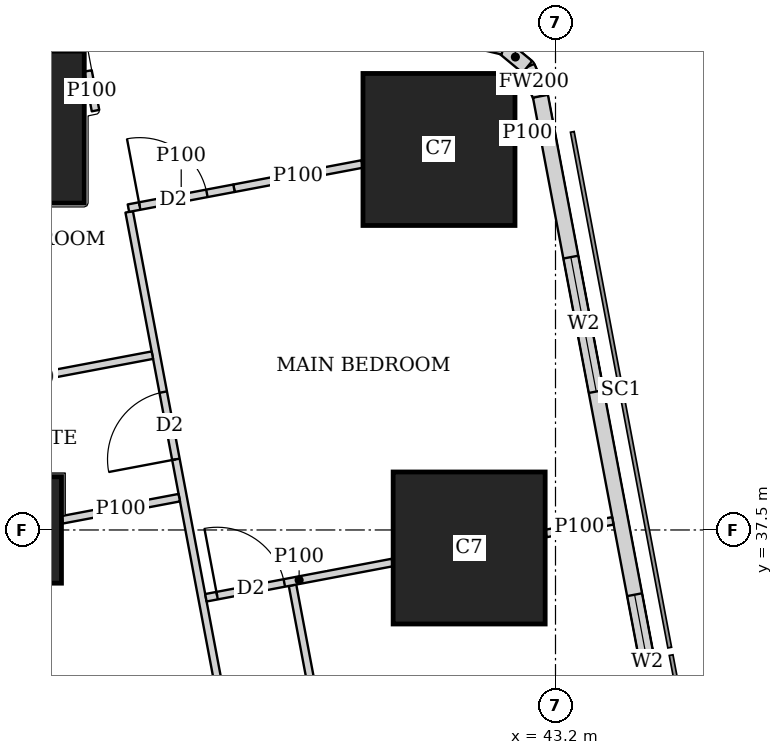
"""IFC4 building model, lengths in metres.
Left out: names, types, materials, properties, quantities, classifications, styles, units other than length and angle.
Written with IfcOpenShell. Run it as: python <this file> out.ifc"""

import sys

from ifc_helpers import new_model, si_unit, direction, frame, frame_2d, origin, origin_2d, place, context, subcontext, project, spatial, rectangle, extrude, element, fill, save


model = new_model("IFC4")
c1 = context("Model", 3, precision=1e-05, world=origin(), true_north=direction((0.0, 1.0)))
c2 = subcontext(c1, "Body", "Model", "MODEL_VIEW")
j1 = project(units=[si_unit("LENGTHUNIT", "METRE"), si_unit("PLANEANGLEUNIT", "RADIAN")], contexts=[c1])
p1 = place(None, origin())
s1 = spatial("IfcSite", under=j1, at=p1, CompositionType="ELEMENT")
p2 = place(p1, origin())
s2 = spatial("IfcBuilding", under=s1, at=p2, CompositionType="ELEMENT")
p3 = place(p2, frame((0.0, 0.0, 285.35)))
s3 = spatial("IfcBuildingStorey", under=s2, at=p3, CompositionType="ELEMENT", Elevation=285.35)
p4 = place(p3, frame((36.0, 37.5, 0.0), z_axis=(0.0, 0.0, 1.0), x_axis=(1.0, 0.0, 0.0)))
e1 = element("IfcColumn", 1, at=p4, inside=s3, PredefinedType="COLUMN", context=c2, shape_type="SweptSolid", body=[
    extrude(rectangle(XDim=1.4, YDim=1.4, at=origin_2d()), origin(), (0.0, 0.0, 1.0), 3.75),
])
for number, where, z_axis, x_axis in (
    (2, (42.064, 37.263, 0.0), (0.0, 0.0, 1.0), (1.0, 0.0, 0.0)),
    (3, (36.0, 42.8, 0.0), (0.0, 0.0, 1.0), (1.0, 0.0, 0.0)),
    (4, (41.667, 42.506, 0.0), (0.0, 0.0, 1.0), (1.0, 0.0, 0.0)),
):
    element("IfcColumn", number, at=place(p3, frame(where, z_axis=z_axis, x_axis=x_axis)), inside=s3, PredefinedType="COLUMN", context=c2, shape_type="SweptSolid", body=[
        extrude(rectangle(XDim=2.0, YDim=2.0, at=origin_2d()), origin(), (0.0, 0.0, 1.0), 3.75),
    ])
p5 = place(p3, frame((49.684, 7.832, 0.0), z_axis=(0.0, 0.0, 1.0), x_axis=(-0.185616669694, 0.982622232565, 0.0)))
e5 = element("IfcWall", 5, at=p5, inside=s3, PredefinedType="SOLIDWALL", context=c2, shape_type="SweptSolid", body=[
    extrude(rectangle(XDim=36.0, YDim=0.2, at=frame_2d((18.0, 0.0))), origin(), (0.0, 0.0, 1.0), 3.5),
])
p6 = place(p5, frame((2.518, 0.0, 0.9)))
e6 = element("IfcOpeningElement", 6, at=p6, cuts=e5, PredefinedType="OPENING", context=c2, shape_type="SweptSolid", body=[
    extrude(rectangle(XDim=2.4, YDim=1.5, at=frame_2d((1.2, 0.75))), frame((0.0, 0.11, 0.0), z_axis=(0.0, -1.0, 0.0), x_axis=(1.0, 0.0, 0.0)), (0.0, 0.0, 1.0), 0.22),
])
p7 = place(p5, frame((8.444, 0.0, 0.9)))
e7 = element("IfcOpeningElement", 7, at=p7, cuts=e5, PredefinedType="OPENING", context=c2, shape_type="SweptSolid", body=[
    extrude(rectangle(XDim=1.8, YDim=1.5, at=frame_2d((0.9, 0.75))), frame((0.0, 0.11, 0.0), z_axis=(0.0, -1.0, 0.0), x_axis=(1.0, 0.0, 0.0)), (0.0, 0.0, 1.0), 0.22),
])
p8 = place(p5, frame((12.261, 0.0, 0.9)))
e8 = element("IfcOpeningElement", 8, at=p8, cuts=e5, PredefinedType="OPENING", context=c2, shape_type="SweptSolid", body=[
    extrude(rectangle(XDim=1.8, YDim=1.5, at=frame_2d((0.9, 0.75))), frame((0.0, 0.11, 0.0), z_axis=(0.0, -1.0, 0.0), x_axis=(1.0, 0.0, 0.0)), (0.0, 0.0, 1.0), 0.22),
])
p9 = place(p5, frame((16.078, 0.0, 0.9)))
e9 = element("IfcOpeningElement", 9, at=p9, cuts=e5, PredefinedType="OPENING", context=c2, shape_type="SweptSolid", body=[
    extrude(rectangle(XDim=1.8, YDim=1.5, at=frame_2d((0.9, 0.75))), frame((0.0, 0.11, 0.0), z_axis=(0.0, -1.0, 0.0), x_axis=(1.0, 0.0, 0.0)), (0.0, 0.0, 1.0), 0.22),
])
p10 = place(p5, frame((19.894, 0.0, 0.9)))
e10 = element("IfcOpeningElement", 10, at=p10, cuts=e5, PredefinedType="OPENING", context=c2, shape_type="SweptSolid", body=[
    extrude(rectangle(XDim=1.8, YDim=1.5, at=frame_2d((0.9, 0.75))), frame((0.0, 0.11, 0.0), z_axis=(0.0, -1.0, 0.0), x_axis=(1.0, 0.0, 0.0)), (0.0, 0.0, 1.0), 0.22),
])
p11 = place(p5, frame((23.71, 0.0, 0.9)))
e11 = element("IfcOpeningElement", 11, at=p11, cuts=e5, PredefinedType="OPENING", context=c2, shape_type="SweptSolid", body=[
    extrude(rectangle(XDim=1.8, YDim=1.5, at=frame_2d((0.9, 0.75))), frame((0.0, 0.11, 0.0), z_axis=(0.0, -1.0, 0.0), x_axis=(1.0, 0.0, 0.0)), (0.0, 0.0, 1.0), 0.22),
])
p12 = place(p5, frame((27.526, 0.0, 0.9)))
e12 = element("IfcOpeningElement", 12, at=p12, cuts=e5, PredefinedType="OPENING", context=c2, shape_type="SweptSolid", body=[
    extrude(rectangle(XDim=1.8, YDim=1.5, at=frame_2d((0.9, 0.75))), frame((0.0, 0.11, 0.0), z_axis=(0.0, -1.0, 0.0), x_axis=(1.0, 0.0, 0.0)), (0.0, 0.0, 1.0), 0.22),
])
p13 = place(p5, frame((32.046, 0.0, 0.9)))
e13 = element("IfcOpeningElement", 13, at=p13, cuts=e5, PredefinedType="OPENING", context=c2, shape_type="SweptSolid", body=[
    extrude(rectangle(XDim=1.8, YDim=1.5, at=frame_2d((0.9, 0.75))), frame((0.0, 0.11, 0.0), z_axis=(0.0, -1.0, 0.0), x_axis=(1.0, 0.0, 0.0)), (0.0, 0.0, 1.0), 0.22),
])
p14 = place(p3, frame((43.002, 43.206, 0.0), z_axis=(0.0, 0.0, 1.0), x_axis=(-0.40678170573, 0.913525393124, 0.0)))
e14 = element("IfcWall", 14, at=p14, inside=s3, PredefinedType="SOLIDWALL", context=c2, shape_type="SweptSolid", body=[
    extrude(rectangle(XDim=0.423, YDim=0.2, at=frame_2d((0.211, 0.0))), origin(), (0.0, 0.0, 1.0), 3.5),
])
p15 = place(p3, frame((42.83, 43.592, 0.0), z_axis=(0.0, 0.0, 1.0), x_axis=(-0.771190539797, 0.636604391539, 0.0)))
e15 = element("IfcWall", 15, at=p15, inside=s3, PredefinedType="SOLIDWALL", context=c2, shape_type="SweptSolid", body=[
    extrude(rectangle(XDim=0.41, YDim=0.2, at=frame_2d((0.205, 0.0))), origin(), (0.0, 0.0, 1.0), 3.5),
])
p16 = place(p3, frame((42.514, 43.853, 0.0), z_axis=(0.0, 0.0, 1.0), x_axis=(-0.973288080424, 0.229587265555, 0.0)))
e16 = element("IfcWall", 16, at=p16, inside=s3, PredefinedType="SOLIDWALL", context=c2, shape_type="SweptSolid", body=[
    extrude(rectangle(XDim=0.422, YDim=0.2, at=frame_2d((0.211, 0.0))), origin(), (0.0, 0.0, 1.0), 3.5),
])
p17 = place(p3, frame((34.036, 42.186, 0.0), z_axis=(0.0, 0.0, 1.0), x_axis=(0.185593518645, -0.9826266055, 0.0)))
e17 = element("IfcWall", 17, at=p17, inside=s3, PredefinedType="SOLIDWALL", context=c2, shape_type="SweptSolid", body=[
    extrude(rectangle(XDim=35.961, YDim=0.15, at=frame_2d((17.98, 0.0))), origin(), (0.0, 0.0, 1.0), 2.5),
])
p18 = place(p17, frame((19.345, 0.0, 0.0)))
e18 = element("IfcOpeningElement", 18, at=p18, cuts=e17, PredefinedType="OPENING", context=c2, shape_type="SweptSolid", body=[
    extrude(rectangle(XDim=1.0, YDim=2.1, at=frame_2d((0.5, 1.05))), frame((0.0, 0.085, 0.0), z_axis=(0.0, -1.0, 0.0), x_axis=(1.0, 0.0, 0.0)), (0.0, 0.0, 1.0), 0.17),
])
p19 = place(p17, frame((33.774, 0.0, 0.0)))
e19 = element("IfcOpeningElement", 19, at=p19, cuts=e17, PredefinedType="OPENING", context=c2, shape_type="SweptSolid", body=[
    extrude(rectangle(XDim=1.0, YDim=2.1, at=frame_2d((0.5, 1.05))), frame((0.0, 0.085, 0.0), z_axis=(0.0, -1.0, 0.0), x_axis=(1.0, 0.0, 0.0)), (0.0, 0.0, 1.0), 0.17),
])
p20 = place(p3, frame((37.049, 43.539, 0.0), z_axis=(0.0, 0.0, 1.0), x_axis=(0.186119495745, -0.982527115811, 0.0)))
e20 = element("IfcWall", 20, at=p20, inside=s3, PredefinedType="PARTITIONING", context=c2, shape_type="SweptSolid", body=[
    extrude(rectangle(XDim=0.531, YDim=0.1, at=frame_2d((0.266, 0.0))), origin(), (0.0, 0.0, 1.0), 2.05),
])
p21 = place(p3, frame((42.985, 42.755, 0.0), z_axis=(0.0, 0.0, 1.0), x_axis=(-0.98281924824, -0.184570651215, 0.0)))
e21 = element("IfcWall", 21, at=p21, inside=s3, PredefinedType="PARTITIONING", context=c2, shape_type="SweptSolid", body=[
    extrude(rectangle(XDim=0.313, YDim=0.1, at=frame_2d((0.157, 0.0))), origin(), (0.0, 0.0, 1.0), 3.5),
])
p22 = place(p3, frame((40.657, 42.315, 0.0), z_axis=(0.0, 0.0, 1.0), x_axis=(-0.982603924403, -0.185713563715, 0.0)))
e22 = element("IfcWall", 22, at=p22, inside=s3, PredefinedType="PARTITIONING", context=c2, shape_type="SweptSolid", body=[
    extrude(rectangle(XDim=1.717, YDim=0.1, at=frame_2d((0.858, 0.0))), origin(), (0.0, 0.0, 1.0), 2.05),
])
p23 = place(p3, frame((38.97, 41.996, 0.0), z_axis=(0.0, 0.0, 1.0), x_axis=(-0.982642648049, -0.185508561084, 0.0)))
e23 = element("IfcWall", 23, at=p23, inside=s3, PredefinedType="PARTITIONING", context=c2, shape_type="SweptSolid", body=[
    extrude(rectangle(XDim=1.413, YDim=0.1, at=frame_2d((0.707, 0.0))), origin(), (0.0, 0.0, 1.0), 3.5),
])
p24 = place(p23, frame((0.363, 0.0, 0.0)))
e24 = element("IfcOpeningElement", 24, at=p24, cuts=e23, PredefinedType="OPENING", context=c2, shape_type="SweptSolid", body=[
    extrude(rectangle(XDim=0.9, YDim=2.1, at=frame_2d((0.45, 1.05))), frame((0.0, 0.06, 0.0), z_axis=(0.0, -1.0, 0.0), x_axis=(1.0, 0.0, 0.0)), (0.0, 0.0, 1.0), 0.12),
])
p25 = place(p3, frame((43.955, 37.62, 0.0), z_axis=(0.0, 0.0, 1.0), x_axis=(-0.982708424405, -0.18515980288, 0.0)))
e25 = element("IfcWall", 25, at=p25, inside=s3, PredefinedType="PARTITIONING", context=c2, shape_type="SweptSolid", body=[
    extrude(rectangle(XDim=0.897, YDim=0.1, at=frame_2d((0.448, 0.0))), origin(), (0.0, 0.0, 1.0), 3.5),
])
p26 = place(p3, frame((41.054, 37.072, 0.0), z_axis=(0.0, 0.0, 1.0), x_axis=(-0.982579896219, -0.185840650951, 0.0)))
e26 = element("IfcWall", 26, at=p26, inside=s3, PredefinedType="PARTITIONING", context=c2, shape_type="SweptSolid", body=[
    extrude(rectangle(XDim=2.497, YDim=0.1, at=frame_2d((1.249, 0.0))), origin(), (0.0, 0.0, 1.0), 3.5),
])
p27 = place(p26, frame((1.447, 0.0, 0.0)))
e27 = element("IfcOpeningElement", 27, at=p27, cuts=e26, PredefinedType="OPENING", context=c2, shape_type="SweptSolid", body=[
    extrude(rectangle(XDim=0.9, YDim=2.1, at=frame_2d((0.45, 1.05))), frame((0.0, 0.06, 0.0), z_axis=(0.0, -1.0, 0.0), x_axis=(1.0, 0.0, 0.0)), (0.0, 0.0, 1.0), 0.12),
])
p28 = place(p3, frame((37.896, 39.8, 0.0), z_axis=(0.0, 0.0, 1.0), x_axis=(-0.982607026909, -0.185697147715, 0.0)))
e28 = element("IfcWall", 28, at=p28, inside=s3, PredefinedType="PARTITIONING", context=c2, shape_type="SweptSolid", body=[
    extrude(rectangle(XDim=3.275, YDim=0.1, at=frame_2d((1.637, 0.0))), origin(), (0.0, 0.0, 1.0), 3.5),
])
p29 = place(p3, frame((38.25, 37.925, 0.0), z_axis=(0.0, 0.0, 1.0), x_axis=(-0.982610209589, -0.185680305934, 0.0)))
e29 = element("IfcWall", 29, at=p29, inside=s3, PredefinedType="PARTITIONING", context=c2, shape_type="SweptSolid", body=[
    extrude(rectangle(XDim=1.567, YDim=0.1, at=frame_2d((0.784, 0.0))), origin(), (0.0, 0.0, 1.0), 3.5),
])
p30 = place(p3, frame((37.591, 41.685, 0.0), z_axis=(0.0, 0.0, 1.0), x_axis=(0.185541820726, -0.982636368532, 0.0)))
e30 = element("IfcWall", 30, at=p30, inside=s3, PredefinedType="PARTITIONING", context=c2, shape_type="SweptSolid", body=[
    extrude(rectangle(XDim=16.735, YDim=0.1, at=frame_2d((8.367, 0.0))), origin(), (0.0, 0.0, 1.0), 2.5),
])
p31 = place(p30, frame((2.413, 0.0, 0.0)))
e31 = element("IfcOpeningElement", 31, at=p31, cuts=e30, PredefinedType="OPENING", context=c2, shape_type="SweptSolid", body=[
    extrude(rectangle(XDim=0.9, YDim=2.1, at=frame_2d((0.45, 1.05))), frame((0.0, 0.06, 0.0), z_axis=(0.0, -1.0, 0.0), x_axis=(1.0, 0.0, 0.0)), (0.0, 0.0, 1.0), 0.12),
])
p32 = place(p30, frame((6.713, 0.0, 0.0)))
e32 = element("IfcOpeningElement", 32, at=p32, cuts=e30, PredefinedType="OPENING", context=c2, shape_type="SweptSolid", body=[
    extrude(rectangle(XDim=0.9, YDim=2.1, at=frame_2d((0.45, 1.05))), frame((0.0, 0.06, 0.0), z_axis=(0.0, -1.0, 0.0), x_axis=(1.0, 0.0, 0.0)), (0.0, 0.0, 1.0), 0.12),
])
p33 = place(p30, frame((9.805, 0.0, 0.0)))
e33 = element("IfcOpeningElement", 33, at=p33, cuts=e30, PredefinedType="OPENING", context=c2, shape_type="SweptSolid", body=[
    extrude(rectangle(XDim=0.9, YDim=2.1, at=frame_2d((0.45, 1.05))), frame((0.0, 0.06, 0.0), z_axis=(0.0, -1.0, 0.0), x_axis=(1.0, 0.0, 0.0)), (0.0, 0.0, 1.0), 0.12),
])
p34 = place(p30, frame((11.713, 0.0, 0.0)))
e34 = element("IfcOpeningElement", 34, at=p34, cuts=e30, PredefinedType="OPENING", context=c2, shape_type="SweptSolid", body=[
    extrude(rectangle(XDim=0.9, YDim=2.1, at=frame_2d((0.45, 1.05))), frame((0.0, 0.06, 0.0), z_axis=(0.0, -1.0, 0.0), x_axis=(1.0, 0.0, 0.0)), (0.0, 0.0, 1.0), 0.12),
])
p35 = place(p30, frame((14.426, 0.0, 0.0)))
e35 = element("IfcOpeningElement", 35, at=p35, cuts=e30, PredefinedType="OPENING", context=c2, shape_type="SweptSolid", body=[
    extrude(rectangle(XDim=0.9, YDim=2.1, at=frame_2d((0.45, 1.05))), frame((0.0, 0.06, 0.0), z_axis=(0.0, -1.0, 0.0), x_axis=(1.0, 0.0, 0.0)), (0.0, 0.0, 1.0), 0.12),
])
p36 = place(p3, frame((39.74, 36.773, 0.0), z_axis=(0.0, 0.0, 1.0), x_axis=(0.185583825641, -0.982628436216, 0.0)))
e36 = element("IfcWall", 36, at=p36, inside=s3, PredefinedType="PARTITIONING", context=c2, shape_type="SweptSolid", body=[
    extrude(rectangle(XDim=7.533, YDim=0.1, at=frame_2d((3.766, 0.0))), origin(), (0.0, 0.0, 1.0), 2.5),
])
p37 = place(p36, frame((2.726, 0.0, 0.0)))
e37 = element("IfcOpeningElement", 37, at=p37, cuts=e36, PredefinedType="OPENING", context=c2, shape_type="SweptSolid", body=[
    extrude(rectangle(XDim=0.9, YDim=2.1, at=frame_2d((0.45, 1.05))), frame((0.0, 0.06, 0.0), z_axis=(0.0, -1.0, 0.0), x_axis=(1.0, 0.0, 0.0)), (0.0, 0.0, 1.0), 0.12),
])
p38 = place(p36, frame((6.383, 0.0, 0.0)))
e38 = element("IfcOpeningElement", 38, at=p38, cuts=e36, PredefinedType="OPENING", context=c2, shape_type="SweptSolid", body=[
    extrude(rectangle(XDim=0.9, YDim=2.1, at=frame_2d((0.45, 1.05))), frame((0.0, 0.06, 0.0), z_axis=(0.0, -1.0, 0.0), x_axis=(1.0, 0.0, 0.0)), (0.0, 0.0, 1.0), 0.12),
])
p39 = place(p12, origin())
e39 = element("IfcWindow", 39, at=p39, inside=s3, PartitioningType="SINGLE_PANEL", PredefinedType="WINDOW", context=c2, shape_type="SweptSolid", body=[
    extrude(rectangle(XDim=1.8, YDim=1.5, at=frame_2d((0.9, 0.75))), frame((0.0, 0.03, 0.0), z_axis=(0.0, -1.0, 0.0), x_axis=(1.0, 0.0, 0.0)), (0.0, 0.0, 1.0), 0.06),
])
fill(e12, e39)
p40 = place(p13, origin())
e40 = element("IfcWindow", 40, at=p40, inside=s3, PartitioningType="SINGLE_PANEL", PredefinedType="WINDOW", context=c2, shape_type="SweptSolid", body=[
    extrude(rectangle(XDim=1.8, YDim=1.5, at=frame_2d((0.9, 0.75))), frame((0.0, 0.03, 0.0), z_axis=(0.0, -1.0, 0.0), x_axis=(1.0, 0.0, 0.0)), (0.0, 0.0, 1.0), 0.06),
])
fill(e13, e40)
p41 = place(p27, origin())
e41 = element("IfcDoor", 41, at=p41, inside=s3, OperationType="SINGLE_SWING_LEFT", PredefinedType="DOOR", context=c2, shape_type="SweptSolid", body=[
    extrude(rectangle(XDim=0.9, YDim=2.1, at=frame_2d((0.45, 1.05))), frame((0.0, 0.025, 0.0), z_axis=(0.0, -1.0, 0.0), x_axis=(1.0, 0.0, 0.0)), (0.0, 0.0, 1.0), 0.05),
])
fill(e27, e41)
p42 = place(p24, origin())
e42 = element("IfcDoor", 42, at=p42, inside=s3, OperationType="SINGLE_SWING_LEFT", PredefinedType="DOOR", context=c2, shape_type="SweptSolid", body=[
    extrude(rectangle(XDim=0.9, YDim=2.1, at=frame_2d((0.45, 1.05))), frame((0.0, 0.025, 0.0), z_axis=(0.0, -1.0, 0.0), x_axis=(1.0, 0.0, 0.0)), (0.0, 0.0, 1.0), 0.05),
])
fill(e24, e42)
p43 = place(p31, origin())
e43 = element("IfcDoor", 43, at=p43, inside=s3, OperationType="SINGLE_SWING_LEFT", PredefinedType="DOOR", context=c2, shape_type="SweptSolid", body=[
    extrude(rectangle(XDim=0.9, YDim=2.1, at=frame_2d((0.45, 1.05))), frame((0.0, 0.025, 0.0), z_axis=(0.0, -1.0, 0.0), x_axis=(1.0, 0.0, 0.0)), (0.0, 0.0, 1.0), 0.05),
])
fill(e31, e43)
save(model, sys.argv[1])
